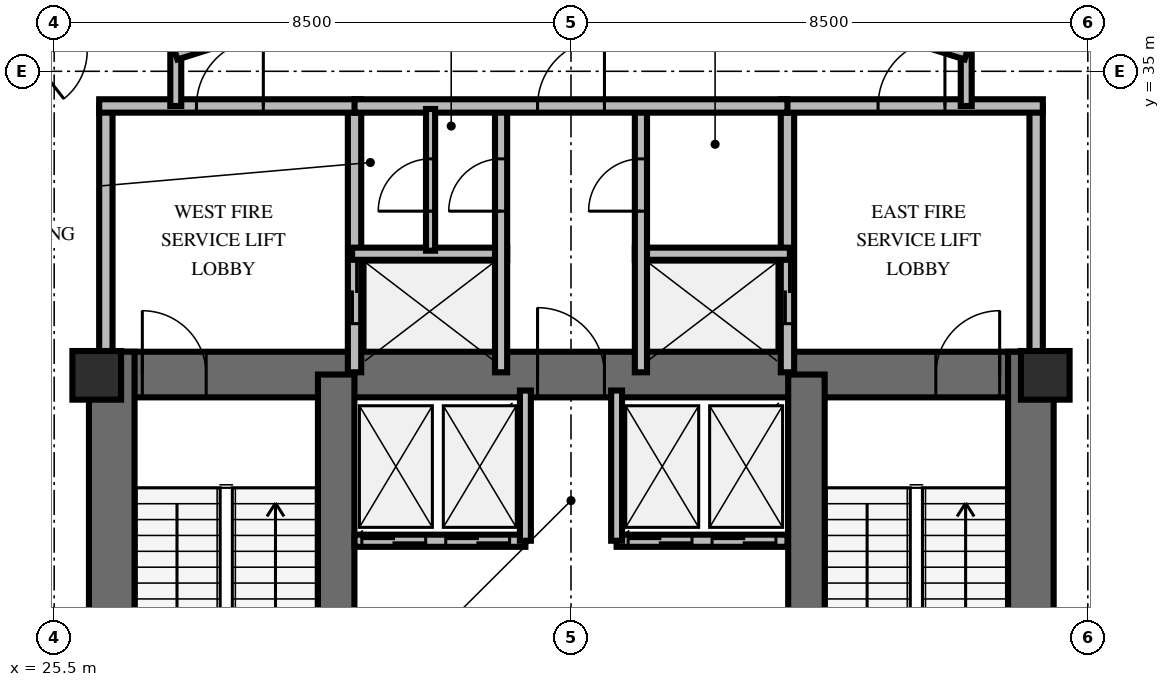
"""IFC4 building model, lengths in metres.
Left out: names, types, materials, properties, quantities, classifications, styles, units other than length and angle.
Written with IfcOpenShell. Run it as: python <this file> out.ifc"""

import sys

from ifc_helpers import new_model, si_unit, direction, frame, frame_2d, origin, origin_2d, place, context, subcontext, project, spatial, rectangle, extrude, element, fill, save


model = new_model("IFC4")
c1 = context("Model", 3, precision=1e-05, world=origin(), true_north=direction((0.0, 1.0)))
c2 = subcontext(c1, "Body", "Model", "MODEL_VIEW")
j1 = project(units=[si_unit("LENGTHUNIT", "METRE"), si_unit("PLANEANGLEUNIT", "RADIAN")], contexts=[c1])
p1 = place(None, origin())
s1 = spatial("IfcSite", under=j1, at=p1, CompositionType="ELEMENT")
p2 = place(p1, origin())
s2 = spatial("IfcBuilding", under=s1, at=p2, CompositionType="ELEMENT")
p3 = place(p2, frame((0.0, 0.0, 191.6)))
s3 = spatial("IfcBuildingStorey", under=s2, at=p3, CompositionType="ELEMENT", Elevation=191.6)
p4 = place(p3, frame((26.072, 30.013, 0.0), z_axis=(0.0, 0.0, 1.0), x_axis=(1.0, 0.0, 0.0)))
e1 = element("IfcWall", 1, at=p4, inside=s3, PredefinedType="SHEAR", context=c2, shape_type="SweptSolid", body=[
    extrude(rectangle(XDim=15.866, YDim=0.75, at=frame_2d((7.933, 0.0))), origin(), (0.0, 0.0, 1.0), 3.6),
])
p5 = place(p4, frame((0.878, 0.0, 0.0)))
e2 = element("IfcOpeningElement", 2, at=p5, cuts=e1, PredefinedType="OPENING", context=c2, shape_type="SweptSolid", body=[
    extrude(rectangle(XDim=1.05, YDim=2.15, at=frame_2d((0.525, 1.075))), frame((0.0, 0.385, 0.0), z_axis=(0.0, -1.0, 0.0), x_axis=(1.0, 0.0, 0.0)), (0.0, 0.0, 1.0), 0.77),
])
p6 = place(p4, frame((13.928, 0.0, 0.0)))
e3 = element("IfcOpeningElement", 3, at=p6, cuts=e1, PredefinedType="OPENING", context=c2, shape_type="SweptSolid", body=[
    extrude(rectangle(XDim=1.05, YDim=2.15, at=frame_2d((0.525, 1.075))), frame((0.0, 0.385, 0.0), z_axis=(0.0, -1.0, 0.0), x_axis=(1.0, 0.0, 0.0)), (0.0, 0.0, 1.0), 0.77),
])
p7 = place(p4, frame((7.378, 0.0, 0.0)))
e4 = element("IfcOpeningElement", 4, at=p7, cuts=e1, PredefinedType="OPENING", context=c2, shape_type="SweptSolid", body=[
    extrude(rectangle(XDim=1.1, YDim=2.15, at=frame_2d((0.55, 1.075))), frame((0.0, 0.385, 0.0), z_axis=(0.0, -1.0, 0.0), x_axis=(1.0, 0.0, 0.0)), (0.0, 0.0, 1.0), 0.77),
])
for number, where, z_axis, x_axis in (
    (5, (26.447, 19.812, 0.0), (0.0, 0.0, 1.0), (0.0, 1.0, 0.0)),
    (6, (41.563, 19.812, 0.0), (0.0, 0.0, 1.0), (0.0, 1.0, 0.0)),
):
    element("IfcWall", number, at=place(p3, frame(where, z_axis=z_axis, x_axis=x_axis)), inside=s3, PredefinedType="SHEAR", context=c2, shape_type="SweptSolid", body=[
        extrude(rectangle(XDim=10.576, YDim=0.75, at=frame_2d((5.288, 0.0))), origin(), (0.0, 0.0, 1.0), 3.6),
    ])
for number, where, z_axis, x_axis in (
    (7, (30.138, 20.187, 0.0), (0.0, 0.0, 1.0), (0.0, 1.0, 0.0)),
    (8, (37.872, 20.187, 0.0), (0.0, 0.0, 1.0), (0.0, 1.0, 0.0)),
):
    element("IfcWall", number, at=place(p3, frame(where, z_axis=z_axis, x_axis=x_axis)), inside=s3, PredefinedType="SHEAR", context=c2, shape_type="SweptSolid", body=[
        extrude(rectangle(XDim=9.826, YDim=0.6, at=frame_2d((4.913, 0.0))), origin(), (0.0, 0.0, 1.0), 3.6),
    ])
for number, where, z_axis, x_axis in (
    (9, (26.2, 30.0, 0.0), (0.0, 0.0, 1.0), (1.0, 0.0, 0.0)),
    (10, (41.8, 30.0, 0.0), (0.0, 0.0, 1.0), (1.0, 0.0, 0.0)),
):
    element("IfcColumn", number, at=place(p3, frame(where, z_axis=z_axis, x_axis=x_axis)), inside=s3, PredefinedType="PILASTER", context=c2, shape_type="SweptSolid", body=[
        extrude(rectangle(XDim=0.8, YDim=0.8, at=origin_2d()), origin(), (0.0, 0.0, 1.0), 3.6),
    ])
p8 = place(p3, frame((26.35, 30.05, 0.0), z_axis=(0.0, 0.0, 1.0), x_axis=(0.0, 1.0, 0.0)))
e11 = element("IfcWall", 11, at=p8, inside=s3, PredefinedType="SOLIDWALL", context=c2, shape_type="SweptSolid", body=[
    extrude(rectangle(XDim=4.38, YDim=0.22, at=frame_2d((2.19, 0.0))), origin(), (0.0, 0.0, 1.0), 2.46),
])
p9 = place(p3, frame((30.44, 30.05, 0.0), z_axis=(0.0, 0.0, 1.0), x_axis=(0.0, 1.0, 0.0)))
e12 = element("IfcWall", 12, at=p9, inside=s3, PredefinedType="SOLIDWALL", context=c2, shape_type="SweptSolid", body=[
    extrude(rectangle(XDim=4.38, YDim=0.22, at=frame_2d((2.19, 0.0))), origin(), (0.0, 0.0, 1.0), 2.46),
])
p10 = place(p9, frame((0.8, 0.0, 0.0)))
e13 = element("IfcOpeningElement", 13, at=p10, cuts=e12, PredefinedType="OPENING", context=c2, shape_type="SweptSolid", body=[
    extrude(rectangle(XDim=1.05, YDim=2.1, at=frame_2d((0.525, 1.05))), frame((0.0, 0.12, 0.0), z_axis=(0.0, -1.0, 0.0), x_axis=(1.0, 0.0, 0.0)), (0.0, 0.0, 1.0), 0.24),
])
p11 = place(p3, frame((26.24, 34.43, 0.0), z_axis=(0.0, 0.0, 1.0), x_axis=(1.0, 0.0, 0.0)))
e14 = element("IfcWall", 14, at=p11, inside=s3, PredefinedType="SOLIDWALL", context=c2, shape_type="SweptSolid", body=[
    extrude(rectangle(XDim=4.31, YDim=0.22, at=frame_2d((2.155, 0.0))), origin(), (0.0, 0.0, 1.0), 2.46),
])
p12 = place(p11, frame((1.6, 0.0, 0.0)))
e15 = element("IfcOpeningElement", 15, at=p12, cuts=e14, PredefinedType="OPENING", context=c2, shape_type="SweptSolid", body=[
    extrude(rectangle(XDim=1.1, YDim=2.15, at=frame_2d((0.55, 1.075))), frame((0.0, 0.12, 0.0), z_axis=(0.0, -1.0, 0.0), x_axis=(1.0, 0.0, 0.0)), (0.0, 0.0, 1.0), 0.24),
])
p13 = place(p3, frame((30.4, 32.0, 0.0), z_axis=(0.0, 0.0, 1.0), x_axis=(1.0, 0.0, 0.0)))
e16 = element("IfcWall", 16, at=p13, inside=s3, PredefinedType="SOLIDWALL", context=c2, shape_type="SweptSolid", body=[
    extrude(rectangle(XDim=2.55, YDim=0.2, at=frame_2d((1.275, 0.0))), origin(), (0.0, 0.0, 1.0), 2.46),
])
p14 = place(p3, frame((32.85, 30.05, 0.0), z_axis=(0.0, 0.0, 1.0), x_axis=(0.0, 1.0, 0.0)))
e17 = element("IfcWall", 17, at=p14, inside=s3, PredefinedType="SOLIDWALL", context=c2, shape_type="SweptSolid", body=[
    extrude(rectangle(XDim=4.38, YDim=0.2, at=frame_2d((2.19, 0.0))), origin(), (0.0, 0.0, 1.0), 2.46),
])
p15 = place(p14, frame((2.65, 0.0, 0.0)))
e18 = element("IfcOpeningElement", 18, at=p15, cuts=e17, PredefinedType="OPENING", context=c2, shape_type="SweptSolid", body=[
    extrude(rectangle(XDim=0.86, YDim=2.05, at=frame_2d((0.43, 1.025))), frame((0.0, 0.11, 0.0), z_axis=(0.0, -1.0, 0.0), x_axis=(1.0, 0.0, 0.0)), (0.0, 0.0, 1.0), 0.22),
])
p16 = place(p3, frame((37.56, 30.05, 0.0), z_axis=(0.0, 0.0, 1.0), x_axis=(0.0, 1.0, 0.0)))
e19 = element("IfcWall", 19, at=p16, inside=s3, PredefinedType="SOLIDWALL", context=c2, shape_type="SweptSolid", body=[
    extrude(rectangle(XDim=4.38, YDim=0.22, at=frame_2d((2.19, 0.0))), origin(), (0.0, 0.0, 1.0), 2.46),
])
p17 = place(p16, frame((0.8, 0.0, 0.0)))
e20 = element("IfcOpeningElement", 20, at=p17, cuts=e19, PredefinedType="OPENING", context=c2, shape_type="SweptSolid", body=[
    extrude(rectangle(XDim=1.05, YDim=2.1, at=frame_2d((0.525, 1.05))), frame((0.0, 0.12, 0.0), z_axis=(0.0, -1.0, 0.0), x_axis=(1.0, 0.0, 0.0)), (0.0, 0.0, 1.0), 0.24),
])
p18 = place(p3, frame((41.65, 30.05, 0.0), z_axis=(0.0, 0.0, 1.0), x_axis=(0.0, 1.0, 0.0)))
e21 = element("IfcWall", 21, at=p18, inside=s3, PredefinedType="SOLIDWALL", context=c2, shape_type="SweptSolid", body=[
    extrude(rectangle(XDim=4.38, YDim=0.22, at=frame_2d((2.19, 0.0))), origin(), (0.0, 0.0, 1.0), 2.46),
])
p19 = place(p3, frame((37.45, 34.43, 0.0), z_axis=(0.0, 0.0, 1.0), x_axis=(1.0, 0.0, 0.0)))
e22 = element("IfcWall", 22, at=p19, inside=s3, PredefinedType="SOLIDWALL", context=c2, shape_type="SweptSolid", body=[
    extrude(rectangle(XDim=4.31, YDim=0.22, at=frame_2d((2.155, 0.0))), origin(), (0.0, 0.0, 1.0), 2.46),
])
p20 = place(p19, frame((1.6, 0.0, 0.0)))
e23 = element("IfcOpeningElement", 23, at=p20, cuts=e22, PredefinedType="OPENING", context=c2, shape_type="SweptSolid", body=[
    extrude(rectangle(XDim=1.1, YDim=2.15, at=frame_2d((0.55, 1.075))), frame((0.0, 0.12, 0.0), z_axis=(0.0, -1.0, 0.0), x_axis=(1.0, 0.0, 0.0)), (0.0, 0.0, 1.0), 0.24),
])
p21 = place(p3, frame((35.05, 32.0, 0.0), z_axis=(0.0, 0.0, 1.0), x_axis=(1.0, 0.0, 0.0)))
e24 = element("IfcWall", 24, at=p21, inside=s3, PredefinedType="SOLIDWALL", context=c2, shape_type="SweptSolid", body=[
    extrude(rectangle(XDim=2.55, YDim=0.2, at=frame_2d((1.275, 0.0))), origin(), (0.0, 0.0, 1.0), 2.46),
])
p22 = place(p3, frame((35.15, 30.05, 0.0), z_axis=(0.0, 0.0, 1.0), x_axis=(0.0, 1.0, 0.0)))
e25 = element("IfcWall", 25, at=p22, inside=s3, PredefinedType="SOLIDWALL", context=c2, shape_type="SweptSolid", body=[
    extrude(rectangle(XDim=4.38, YDim=0.2, at=frame_2d((2.19, 0.0))), origin(), (0.0, 0.0, 1.0), 2.46),
])
p23 = place(p22, frame((2.65, 0.0, 0.0)))
e26 = element("IfcOpeningElement", 26, at=p23, cuts=e25, PredefinedType="OPENING", context=c2, shape_type="SweptSolid", body=[
    extrude(rectangle(XDim=0.86, YDim=2.05, at=frame_2d((0.43, 1.025))), frame((0.0, 0.11, 0.0), z_axis=(0.0, -1.0, 0.0), x_axis=(1.0, 0.0, 0.0)), (0.0, 0.0, 1.0), 0.22),
])
p24 = place(p3, frame((30.44, 34.43, 0.0), z_axis=(0.0, 0.0, 1.0), x_axis=(1.0, 0.0, 0.0)))
e27 = element("IfcWall", 27, at=p24, inside=s3, PredefinedType="SOLIDWALL", context=c2, shape_type="SweptSolid", body=[
    extrude(rectangle(XDim=7.12, YDim=0.22, at=frame_2d((3.56, 0.0))), origin(), (0.0, 0.0, 1.0), 2.46),
])
p25 = place(p24, frame((3.01, 0.0, 0.0)))
e28 = element("IfcOpeningElement", 28, at=p25, cuts=e27, PredefinedType="OPENING", context=c2, shape_type="SweptSolid", body=[
    extrude(rectangle(XDim=1.1, YDim=2.15, at=frame_2d((0.55, 1.075))), frame((0.0, 0.12, 0.0), z_axis=(0.0, -1.0, 0.0), x_axis=(1.0, 0.0, 0.0)), (0.0, 0.0, 1.0), 0.24),
])
p26 = place(p3, frame((31.69, 32.05, 0.0), z_axis=(0.0, 0.0, 1.0), x_axis=(0.0, 1.0, 0.0)))
e29 = element("IfcWall", 29, at=p26, inside=s3, PredefinedType="PARTITIONING", context=c2, shape_type="SweptSolid", body=[
    extrude(rectangle(XDim=2.33, YDim=0.15, at=frame_2d((1.165, 0.0))), origin(), (0.0, 0.0, 1.0), 2.46),
])
p27 = place(p26, frame((0.65, 0.0, 0.0)))
e30 = element("IfcOpeningElement", 30, at=p27, cuts=e29, PredefinedType="OPENING", context=c2, shape_type="SweptSolid", body=[
    extrude(rectangle(XDim=0.86, YDim=2.05, at=frame_2d((0.43, 1.025))), frame((0.0, 0.085, 0.0), z_axis=(0.0, -1.0, 0.0), x_axis=(1.0, 0.0, 0.0)), (0.0, 0.0, 1.0), 0.17),
])
p28 = place(p3, frame((30.44, 27.28, 0.0), z_axis=(0.0, 0.0, 1.0), x_axis=(1.0, 0.0, 0.0)))
e31 = element("IfcWall", 31, at=p28, inside=s3, PredefinedType="SOLIDWALL", context=c2, shape_type="SweptSolid", body=[
    extrude(rectangle(XDim=2.81, YDim=0.2, at=frame_2d((1.405, 0.0))), origin(), (0.0, 0.0, 1.0), 2.46),
])
p29 = place(p28, frame((0.12, 0.0, 0.0)))
e32 = element("IfcOpeningElement", 32, at=p29, cuts=e31, PredefinedType="OPENING", context=c2, shape_type="SweptSolid", body=[
    extrude(rectangle(XDim=1.05, YDim=2.1, at=frame_2d((0.525, 1.05))), frame((0.0, 0.11, 0.0), z_axis=(0.0, -1.0, 0.0), x_axis=(1.0, 0.0, 0.0)), (0.0, 0.0, 1.0), 0.22),
])
p30 = place(p28, frame((1.5, 0.0, 0.0)))
e33 = element("IfcOpeningElement", 33, at=p30, cuts=e31, PredefinedType="OPENING", context=c2, shape_type="SweptSolid", body=[
    extrude(rectangle(XDim=1.05, YDim=2.1, at=frame_2d((0.525, 1.05))), frame((0.0, 0.11, 0.0), z_axis=(0.0, -1.0, 0.0), x_axis=(1.0, 0.0, 0.0)), (0.0, 0.0, 1.0), 0.22),
])
p31 = place(p3, frame((33.25, 27.28, 0.0), z_axis=(0.0, 0.0, 1.0), x_axis=(0.0, 1.0, 0.0)))
e34 = element("IfcWall", 34, at=p31, inside=s3, PredefinedType="SOLIDWALL", context=c2, shape_type="SweptSolid", body=[
    extrude(rectangle(XDim=2.47, YDim=0.18, at=frame_2d((1.235, 0.0))), origin(), (0.0, 0.0, 1.0), 2.46),
])
p32 = place(p3, frame((34.75, 27.28, 0.0), z_axis=(0.0, 0.0, 1.0), x_axis=(1.0, 0.0, 0.0)))
e35 = element("IfcWall", 35, at=p32, inside=s3, PredefinedType="SOLIDWALL", context=c2, shape_type="SweptSolid", body=[
    extrude(rectangle(XDim=2.81, YDim=0.2, at=frame_2d((1.405, 0.0))), origin(), (0.0, 0.0, 1.0), 2.46),
])
p33 = place(p32, frame((0.19, 0.0, 0.0)))
e36 = element("IfcOpeningElement", 36, at=p33, cuts=e35, PredefinedType="OPENING", context=c2, shape_type="SweptSolid", body=[
    extrude(rectangle(XDim=1.05, YDim=2.1, at=frame_2d((0.525, 1.05))), frame((0.0, 0.11, 0.0), z_axis=(0.0, -1.0, 0.0), x_axis=(1.0, 0.0, 0.0)), (0.0, 0.0, 1.0), 0.22),
])
p34 = place(p32, frame((1.57, 0.0, 0.0)))
e37 = element("IfcOpeningElement", 37, at=p34, cuts=e35, PredefinedType="OPENING", context=c2, shape_type="SweptSolid", body=[
    extrude(rectangle(XDim=1.05, YDim=2.1, at=frame_2d((0.525, 1.05))), frame((0.0, 0.11, 0.0), z_axis=(0.0, -1.0, 0.0), x_axis=(1.0, 0.0, 0.0)), (0.0, 0.0, 1.0), 0.22),
])
p35 = place(p3, frame((34.75, 27.28, 0.0), z_axis=(0.0, 0.0, 1.0), x_axis=(0.0, 1.0, 0.0)))
e38 = element("IfcWall", 38, at=p35, inside=s3, PredefinedType="SOLIDWALL", context=c2, shape_type="SweptSolid", body=[
    extrude(rectangle(XDim=2.47, YDim=0.18, at=frame_2d((1.235, 0.0))), origin(), (0.0, 0.0, 1.0), 2.46),
])
for number, where, z_axis, x_axis in (
    (39, (27.5, 34.43, 0.0), (0.0, 0.0, 1.0), (0.0, 1.0, 0.0)),
    (40, (40.5, 35.28, 0.0), (0.0, 0.0, 1.0), (0.0, -1.0, 0.0)),
):
    element("IfcWall", number, at=place(p3, frame(where, z_axis=z_axis, x_axis=x_axis)), inside=s3, PredefinedType="PARTITIONING", context=c2, shape_type="SweptSolid", body=[
        extrude(rectangle(XDim=0.85, YDim=0.18, at=frame_2d((0.425, 0.0))), origin(), (0.0, 0.0, 1.0), 2.46),
    ])
p36 = place(p3, frame((27.5, 35.28, 0.0), z_axis=(0.0, 0.0, 1.0), x_axis=(0.953691418528, 0.300786765376, 0.0)))
e41 = element("IfcWall", 41, at=p36, inside=s3, PredefinedType="PARTITIONING", context=c2, shape_type="SweptSolid", body=[
    extrude(rectangle(XDim=6.816, YDim=0.18, at=frame_2d((3.408, 0.0))), origin(), (0.0, 0.0, 1.0), 2.46),
])
p37 = place(p36, frame((2.858, 0.0, 0.0)))
e42 = element("IfcOpeningElement", 42, at=p37, cuts=e41, PredefinedType="OPENING", context=c2, shape_type="SweptSolid", body=[
    extrude(rectangle(XDim=1.1, YDim=2.15, at=frame_2d((0.55, 1.075))), frame((0.0, 0.1, 0.0), z_axis=(0.0, -1.0, 0.0), x_axis=(1.0, 0.0, 0.0)), (0.0, 0.0, 1.0), 0.2),
])
p38 = place(p3, frame((34.0, 37.33, 0.0), z_axis=(0.0, 0.0, 1.0), x_axis=(0.953691418528, -0.300786765376, 0.0)))
e43 = element("IfcWall", 43, at=p38, inside=s3, PredefinedType="PARTITIONING", context=c2, shape_type="SweptSolid", body=[
    extrude(rectangle(XDim=6.816, YDim=0.18, at=frame_2d((3.408, 0.0))), origin(), (0.0, 0.0, 1.0), 2.46),
])
p39 = place(p38, frame((2.858, 0.0, 0.0)))
e44 = element("IfcOpeningElement", 44, at=p39, cuts=e43, PredefinedType="OPENING", context=c2, shape_type="SweptSolid", body=[
    extrude(rectangle(XDim=1.1, YDim=2.15, at=frame_2d((0.55, 1.075))), frame((0.0, 0.1, 0.0), z_axis=(0.0, -1.0, 0.0), x_axis=(1.0, 0.0, 0.0)), (0.0, 0.0, 1.0), 0.2),
])
p40 = place(p3, frame((44.299, 34.047, 0.0), z_axis=(0.0, 0.0, 1.0), x_axis=(-0.74314168775, 0.669134091141, 0.0)))
e45 = element("IfcWall", 45, at=p40, inside=s3, PredefinedType="PARTITIONING", context=c2, shape_type="SweptSolid", body=[
    extrude(rectangle(XDim=4.539, YDim=0.18, at=frame_2d((2.27, 0.0))), origin(), (0.0, 0.0, 1.0), 2.46),
])
p41 = place(p3, frame((27.864, 37.54, 0.0), z_axis=(0.0, 0.0, 1.0), x_axis=(-0.788026820044, -0.61564091067, 0.0)))
e46 = element("IfcWall", 46, at=p41, inside=s3, PredefinedType="PARTITIONING", context=c2, shape_type="SweptSolid", body=[
    extrude(rectangle(XDim=4.539, YDim=0.18, at=frame_2d((2.27, 0.0))), origin(), (0.0, 0.0, 1.0), 2.46),
])
p42 = place(p41, frame((2.579, 0.0, 0.0)))
e47 = element("IfcOpeningElement", 47, at=p42, cuts=e46, PredefinedType="OPENING", context=c2, shape_type="SweptSolid", body=[
    extrude(rectangle(XDim=1.0, YDim=2.15, at=frame_2d((0.5, 1.075))), frame((0.0, 0.1, 0.0), z_axis=(0.0, -1.0, 0.0), x_axis=(1.0, 0.0, 0.0)), (0.0, 0.0, 1.0), 0.2),
])
p43 = place(p5, origin())
e48 = element("IfcDoor", 48, at=p43, inside=s3, OperationType="SINGLE_SWING_LEFT", PredefinedType="DOOR", context=c2, shape_type="SweptSolid", body=[
    extrude(rectangle(XDim=1.05, YDim=2.15, at=frame_2d((0.525, 1.075))), frame((0.0, 0.025, 0.0), z_axis=(0.0, -1.0, 0.0), x_axis=(1.0, 0.0, 0.0)), (0.0, 0.0, 1.0), 0.05),
])
fill(e2, e48)
p44 = place(p6, origin())
e49 = element("IfcDoor", 49, at=p44, inside=s3, OperationType="SINGLE_SWING_RIGHT", PredefinedType="DOOR", context=c2, shape_type="SweptSolid", body=[
    extrude(rectangle(XDim=1.05, YDim=2.15, at=frame_2d((0.525, 1.075))), frame((0.0, 0.025, 0.0), z_axis=(0.0, -1.0, 0.0), x_axis=(1.0, 0.0, 0.0)), (0.0, 0.0, 1.0), 0.05),
])
fill(e3, e49)
p45 = place(p7, origin())
e50 = element("IfcDoor", 50, at=p45, inside=s3, OperationType="SINGLE_SWING_LEFT", PredefinedType="DOOR", context=c2, shape_type="SweptSolid", body=[
    extrude(rectangle(XDim=1.1, YDim=2.15, at=frame_2d((0.55, 1.075))), frame((0.0, 0.025, 0.0), z_axis=(0.0, -1.0, 0.0), x_axis=(1.0, 0.0, 0.0)), (0.0, 0.0, 1.0), 0.05),
])
fill(e4, e50)
p46 = place(p12, origin())
e51 = element("IfcDoor", 51, at=p46, inside=s3, OperationType="SINGLE_SWING_RIGHT", PredefinedType="DOOR", context=c2, shape_type="SweptSolid", body=[
    extrude(rectangle(XDim=1.1, YDim=2.15, at=frame_2d((0.55, 1.075))), frame((0.0, 0.025, 0.0), z_axis=(0.0, -1.0, 0.0), x_axis=(1.0, 0.0, 0.0)), (0.0, 0.0, 1.0), 0.05),
])
fill(e15, e51)
p47 = place(p10, origin())
e52 = element("IfcDoor", 52, at=p47, inside=s3, OperationType="DOUBLE_DOOR_SLIDING", PredefinedType="USERDEFINED", context=c2, shape_type="SweptSolid", body=[
    extrude(rectangle(XDim=1.05, YDim=2.1, at=frame_2d((0.525, 1.05))), frame((0.0, 0.025, 0.0), z_axis=(0.0, -1.0, 0.0), x_axis=(1.0, 0.0, 0.0)), (0.0, 0.0, 1.0), 0.05),
])
fill(e13, e52)
p48 = place(p15, origin())
e53 = element("IfcDoor", 53, at=p48, inside=s3, OperationType="SINGLE_SWING_LEFT", PredefinedType="TRAPDOOR", context=c2, shape_type="SweptSolid", body=[
    extrude(rectangle(XDim=0.86, YDim=2.05, at=frame_2d((0.43, 1.025))), frame((0.0, 0.025, 0.0), z_axis=(0.0, -1.0, 0.0), x_axis=(1.0, 0.0, 0.0)), (0.0, 0.0, 1.0), 0.05),
])
fill(e18, e53)
p49 = place(p20, origin())
e54 = element("IfcDoor", 54, at=p49, inside=s3, OperationType="SINGLE_SWING_RIGHT", PredefinedType="DOOR", context=c2, shape_type="SweptSolid", body=[
    extrude(rectangle(XDim=1.1, YDim=2.15, at=frame_2d((0.55, 1.075))), frame((0.0, 0.025, 0.0), z_axis=(0.0, -1.0, 0.0), x_axis=(1.0, 0.0, 0.0)), (0.0, 0.0, 1.0), 0.05),
])
fill(e23, e54)
p50 = place(p17, origin())
e55 = element("IfcDoor", 55, at=p50, inside=s3, OperationType="DOUBLE_DOOR_SLIDING", PredefinedType="USERDEFINED", context=c2, shape_type="SweptSolid", body=[
    extrude(rectangle(XDim=1.05, YDim=2.1, at=frame_2d((0.525, 1.05))), frame((0.0, 0.025, 0.0), z_axis=(0.0, -1.0, 0.0), x_axis=(1.0, 0.0, 0.0)), (0.0, 0.0, 1.0), 0.05),
])
fill(e20, e55)
p51 = place(p23, origin())
e56 = element("IfcDoor", 56, at=p51, inside=s3, OperationType="SINGLE_SWING_LEFT", PredefinedType="TRAPDOOR", context=c2, shape_type="SweptSolid", body=[
    extrude(rectangle(XDim=0.86, YDim=2.05, at=frame_2d((0.43, 1.025))), frame((0.0, 0.025, 0.0), z_axis=(0.0, -1.0, 0.0), x_axis=(1.0, 0.0, 0.0)), (0.0, 0.0, 1.0), 0.05),
])
fill(e26, e56)
p52 = place(p25, origin())
e57 = element("IfcDoor", 57, at=p52, inside=s3, OperationType="SINGLE_SWING_RIGHT", PredefinedType="DOOR", context=c2, shape_type="SweptSolid", body=[
    extrude(rectangle(XDim=1.1, YDim=2.15, at=frame_2d((0.55, 1.075))), frame((0.0, 0.025, 0.0), z_axis=(0.0, -1.0, 0.0), x_axis=(1.0, 0.0, 0.0)), (0.0, 0.0, 1.0), 0.05),
])
fill(e28, e57)
p53 = place(p27, origin())
e58 = element("IfcDoor", 58, at=p53, inside=s3, OperationType="SINGLE_SWING_LEFT", PredefinedType="TRAPDOOR", context=c2, shape_type="SweptSolid", body=[
    extrude(rectangle(XDim=0.86, YDim=2.05, at=frame_2d((0.43, 1.025))), frame((0.0, 0.025, 0.0), z_axis=(0.0, -1.0, 0.0), x_axis=(1.0, 0.0, 0.0)), (0.0, 0.0, 1.0), 0.05),
])
fill(e30, e58)
p54 = place(p29, origin())
e59 = element("IfcDoor", 59, at=p54, inside=s3, OperationType="DOUBLE_DOOR_SLIDING", PredefinedType="USERDEFINED", context=c2, shape_type="SweptSolid", body=[
    extrude(rectangle(XDim=1.05, YDim=2.1, at=frame_2d((0.525, 1.05))), frame((0.0, 0.025, 0.0), z_axis=(0.0, -1.0, 0.0), x_axis=(1.0, 0.0, 0.0)), (0.0, 0.0, 1.0), 0.05),
])
fill(e32, e59)
p55 = place(p30, origin())
e60 = element("IfcDoor", 60, at=p55, inside=s3, OperationType="DOUBLE_DOOR_SLIDING", PredefinedType="USERDEFINED", context=c2, shape_type="SweptSolid", body=[
    extrude(rectangle(XDim=1.05, YDim=2.1, at=frame_2d((0.525, 1.05))), frame((0.0, 0.025, 0.0), z_axis=(0.0, -1.0, 0.0), x_axis=(1.0, 0.0, 0.0)), (0.0, 0.0, 1.0), 0.05),
])
fill(e33, e60)
p56 = place(p33, origin())
e61 = element("IfcDoor", 61, at=p56, inside=s3, OperationType="DOUBLE_DOOR_SLIDING", PredefinedType="USERDEFINED", context=c2, shape_type="SweptSolid", body=[
    extrude(rectangle(XDim=1.05, YDim=2.1, at=frame_2d((0.525, 1.05))), frame((0.0, 0.025, 0.0), z_axis=(0.0, -1.0, 0.0), x_axis=(1.0, 0.0, 0.0)), (0.0, 0.0, 1.0), 0.05),
])
fill(e36, e61)
p57 = place(p34, origin())
e62 = element("IfcDoor", 62, at=p57, inside=s3, OperationType="DOUBLE_DOOR_SLIDING", PredefinedType="USERDEFINED", context=c2, shape_type="SweptSolid", body=[
    extrude(rectangle(XDim=1.05, YDim=2.1, at=frame_2d((0.525, 1.05))), frame((0.0, 0.025, 0.0), z_axis=(0.0, -1.0, 0.0), x_axis=(1.0, 0.0, 0.0)), (0.0, 0.0, 1.0), 0.05),
])
fill(e37, e62)
p58 = place(p42, origin())
e63 = element("IfcDoor", 63, at=p58, inside=s3, OperationType="SINGLE_SWING_RIGHT", PredefinedType="DOOR", context=c2, shape_type="SweptSolid", body=[
    extrude(rectangle(XDim=1.0, YDim=2.15, at=frame_2d((0.5, 1.075))), frame((0.0, 0.025, 0.0), z_axis=(0.0, -1.0, 0.0), x_axis=(1.0, 0.0, 0.0)), (0.0, 0.0, 1.0), 0.05),
])
fill(e47, e63)
save(model, sys.argv[1])
